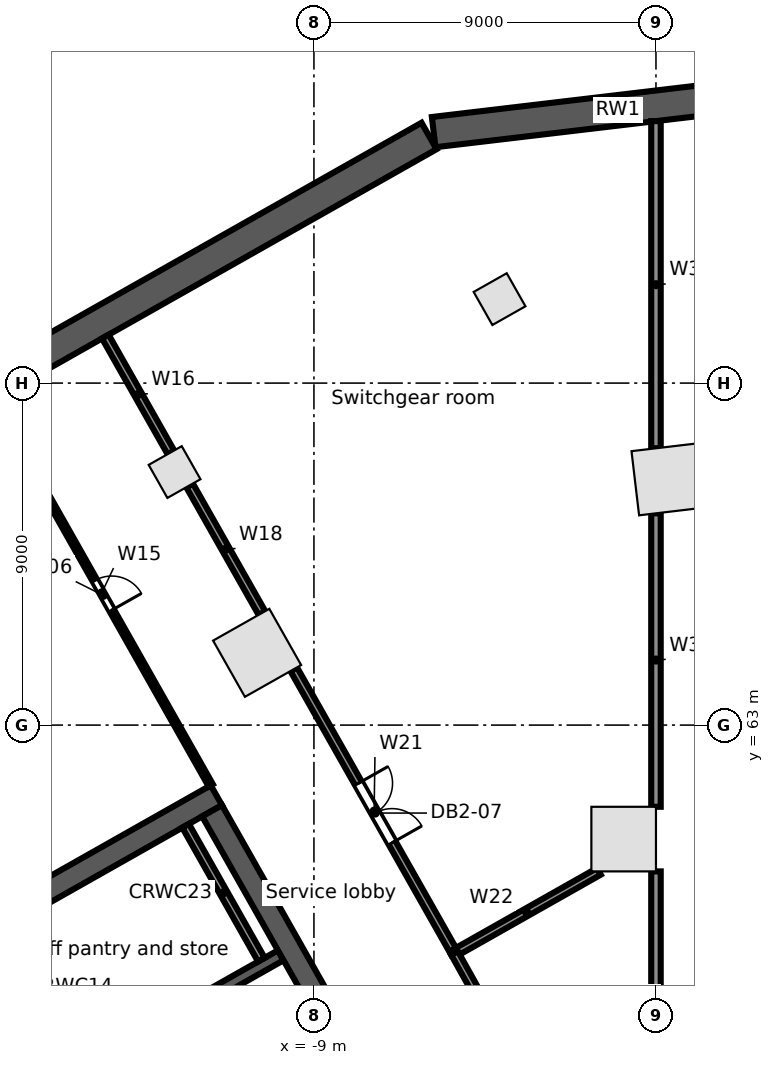
"""IFC4 building model, lengths in metres.
Left out: names, types, materials, properties, quantities, classifications, styles, units other than length and angle.
Written with IfcOpenShell. Run it as: python <this file> out.ifc"""

import sys

from ifc_helpers import new_model, si_unit, direction, frame, frame_2d, origin, origin_2d, place, context, subcontext, project, spatial, rectangle, extrude, element, fill, save


model = new_model("IFC4")
c1 = context("Model", 3, precision=1e-05, world=origin(), true_north=direction((0.0, 1.0)))
c2 = subcontext(c1, "Body", "Model", "MODEL_VIEW")
j1 = project(units=[si_unit("LENGTHUNIT", "METRE"), si_unit("PLANEANGLEUNIT", "RADIAN")], contexts=[c1])
p1 = place(None, origin())
s1 = spatial("IfcSite", under=j1, at=p1, CompositionType="ELEMENT")
p2 = place(p1, origin())
s2 = spatial("IfcBuilding", under=s1, at=p2, CompositionType="ELEMENT")
p3 = place(p2, frame((0.0, 0.0, -9.6)))
s3 = spatial("IfcBuildingStorey", under=s2, at=p3, CompositionType="ELEMENT", Elevation=-9.6)
p4 = place(p3, frame((3.848, 79.753, -0.5), z_axis=(0.0, 0.0, 1.0), x_axis=(-0.993067076287, -0.117549062072, 0.0)))
e1 = element("IfcWall", 1, at=p4, inside=s3, PredefinedType="SOLIDWALL", context=c2, shape_type="SweptSolid", body=[
    extrude(rectangle(XDim=9.766, YDim=0.8, at=frame_2d((4.883, 0.0))), origin(), (0.0, 0.0, 1.0), 5.3),
])
p5 = place(p3, frame((-5.971, 78.503, -0.5), z_axis=(0.0, 0.0, 1.0), x_axis=(-0.870356741611, -0.492421711882, 0.0)))
e2 = element("IfcWall", 2, at=p5, inside=s3, PredefinedType="SOLIDWALL", context=c2, shape_type="SweptSolid", body=[
    extrude(rectangle(XDim=70.604, YDim=0.8, at=frame_2d((35.302, 0.0))), origin(), (0.0, 0.0, 1.0), 5.3),
])
for number, where, z_axis, x_axis in (
    (3, (0.3, 69.464, -0.5), (0.0, 0.0, 1.0), (-0.993, -0.118, 0.0)),
    (4, (-10.495, 64.902, -0.5), (0.0, 0.0, 1.0), (-0.87, -0.492, 0.0)),
    (5, (-0.85, 60.0, -0.5), (0.0, 0.0, 1.0), (0.0, 1.0, 0.0)),
):
    element("IfcColumn", number, at=place(p3, frame(where, z_axis=z_axis, x_axis=x_axis)), inside=s3, PredefinedType="COLUMN", context=c2, shape_type="SweptSolid", body=[
        extrude(rectangle(XDim=1.7, YDim=1.7, at=origin_2d()), origin(), (0.0, 0.0, 1.0), 5.3),
    ])
for number, where, z_axis, x_axis in (
    (6, (-4.116, 74.21, -0.5), (0.0, 0.0, 1.0), (-0.87, -0.492, 0.0)),
    (7, (-12.667, 69.659, -0.5), (0.0, 0.0, 1.0), (-0.87, -0.492, 0.0)),
):
    element("IfcColumn", number, at=place(p3, frame(where, z_axis=z_axis, x_axis=x_axis)), inside=s3, PredefinedType="COLUMN", context=c2, shape_type="SweptSolid", body=[
        extrude(rectangle(XDim=1.0, YDim=1.0, at=origin_2d()), origin(), (0.0, 0.0, 1.0), 5.3),
    ])
p6 = place(p3, frame((-15.618, 53.691, 0.0), z_axis=(0.0, 0.0, 1.0), x_axis=(0.870356769198, 0.492421663121, 0.0)))
e8 = element("IfcWall", 8, at=p6, inside=s3, PredefinedType="SOLIDWALL", context=c2, shape_type="SweptSolid", body=[
    extrude(rectangle(XDim=6.6, YDim=0.3, at=frame_2d((3.3, 0.0))), origin(), (0.0, 0.0, 1.0), 4.4),
])
p7 = place(p6, frame((2.6, 0.0, 0.0)))
e9 = element("IfcOpeningElement", 9, at=p7, cuts=e8, PredefinedType="OPENING", context=c2, shape_type="SweptSolid", body=[
    extrude(rectangle(XDim=0.9, YDim=2.1, at=frame_2d((0.45, 1.05))), frame((0.0, 0.16, 0.0), z_axis=(0.0, -1.0, 0.0), x_axis=(1.0, 0.0, 0.0)), (0.0, 0.0, 1.0), 0.32),
])
p8 = place(p3, frame((-24.623, 53.767, 0.0), z_axis=(0.0, 0.0, 1.0), x_axis=(0.870356627484, 0.492421913601, 0.0)))
e10 = element("IfcWall", 10, at=p8, inside=s3, PredefinedType="SOLIDWALL", context=c2, shape_type="SweptSolid", body=[
    extrude(rectangle(XDim=15.0, YDim=0.6, at=frame_2d((7.5, 0.0))), origin(), (0.0, 0.0, 1.0), 4.4),
])
p9 = place(p3, frame((-17.686, 57.347, 0.0), z_axis=(0.0, 0.0, 1.0), x_axis=(0.492420746998, -0.870357287513, 0.0)))
e11 = element("IfcWall", 11, at=p9, inside=s3, PredefinedType="SOLIDWALL", context=c2, shape_type="SweptSolid", body=[
    extrude(rectangle(XDim=4.05, YDim=0.3, at=frame_2d((2.025, 0.0))), origin(), (0.0, 0.0, 1.0), 4.4),
])
p10 = place(p3, frame((-12.377, 60.351, 0.0), z_axis=(0.0, 0.0, 1.0), x_axis=(0.492440575896, -0.870346068648, 0.0)))
e12 = element("IfcWall", 12, at=p10, inside=s3, PredefinedType="SOLIDWALL", context=c2, shape_type="SweptSolid", body=[
    extrude(rectangle(XDim=4.05, YDim=0.2, at=frame_2d((2.025, 0.0))), origin(), (0.0, 0.0, 1.0), 4.4),
])
p11 = place(p3, frame((-11.681, 60.744, 0.0), z_axis=(0.0, 0.0, 1.0), x_axis=(0.492426772896, -0.870353878221, 0.0)))
e13 = element("IfcWall", 13, at=p11, inside=s3, PredefinedType="SOLIDWALL", context=c2, shape_type="SweptSolid", body=[
    extrude(rectangle(XDim=12.8, YDim=0.6, at=frame_2d((6.4, 0.0))), origin(), (0.0, 0.0, 1.0), 4.4),
])
p12 = place(p3, frame((-17.449, 71.549, 0.0), z_axis=(0.0, 0.0, 1.0), x_axis=(0.492408863594, -0.870364010661, 0.0)))
e14 = element("IfcWall", 14, at=p12, inside=s3, PredefinedType="PARTITIONING", context=c2, shape_type="SweptSolid", body=[
    extrude(rectangle(XDim=11.645, YDim=0.125, at=frame_2d((5.822, 0.0))), origin(), (0.0, 0.0, 1.0), 3.68),
])
p13 = place(p12, frame((5.45, 0.0, 0.0)))
e15 = element("IfcOpeningElement", 15, at=p13, cuts=e14, PredefinedType="OPENING", context=c2, shape_type="SweptSolid", body=[
    extrude(rectangle(XDim=0.9, YDim=2.1, at=frame_2d((0.45, 1.05))), frame((0.0, 0.073, 0.0), z_axis=(0.0, -1.0, 0.0), x_axis=(1.0, 0.0, 0.0)), (0.0, 0.0, 1.0), 0.145),
])
p14 = place(p3, frame((-14.49, 73.224, 0.0), z_axis=(0.0, 0.0, 1.0), x_axis=(0.492785561685, -0.870150785896, 0.0)))
e16 = element("IfcWall", 16, at=p14, inside=s3, PredefinedType="PARTITIONING", context=c2, shape_type="SweptSolid", body=[
    extrude(rectangle(XDim=3.501, YDim=0.2, at=frame_2d((1.75, 0.0))), origin(), (0.0, 0.0, 1.0), 4.4),
])
p15 = place(p3, frame((-12.272, 69.308, 0.0), z_axis=(0.0, 0.0, 1.0), x_axis=(0.492928006212, -0.870070101022, 0.0)))
e17 = element("IfcWall", 17, at=p15, inside=s3, PredefinedType="PARTITIONING", context=c2, shape_type="SweptSolid", body=[
    extrude(rectangle(XDim=3.861, YDim=0.2, at=frame_2d((1.93, 0.0))), origin(), (0.0, 0.0, 1.0), 3.462),
])
p16 = place(p3, frame((-9.532, 64.47, 0.0), z_axis=(0.0, 0.0, 1.0), x_axis=(0.492882680299, -0.870095778326, 0.0)))
e18 = element("IfcWall", 18, at=p16, inside=s3, PredefinedType="PARTITIONING", context=c2, shape_type="SweptSolid", body=[
    extrude(rectangle(XDim=8.584, YDim=0.2, at=frame_2d((4.292, 0.0))), origin(), (0.0, 0.0, 1.0), 3.462),
])
p17 = place(p16, frame((3.45, 0.0, 0.0)))
e19 = element("IfcOpeningElement", 19, at=p17, cuts=e18, PredefinedType="OPENING", context=c2, shape_type="SweptSolid", body=[
    extrude(rectangle(XDim=1.8, YDim=2.1, at=frame_2d((0.9, 1.05))), frame((0.0, 0.11, 0.0), z_axis=(0.0, -1.0, 0.0), x_axis=(1.0, 0.0, 0.0)), (0.0, 0.0, 1.0), 0.22),
])
p18 = place(p3, frame((-5.301, 57.001, 0.0), z_axis=(0.0, 0.0, 1.0), x_axis=(0.870403402545, 0.492339229433, 0.0)))
e20 = element("IfcWall", 20, at=p18, inside=s3, PredefinedType="PARTITIONING", context=c2, shape_type="SweptSolid", body=[
    extrude(rectangle(XDim=4.365, YDim=0.2, at=frame_2d((2.182, 0.0))), origin(), (0.0, 0.0, 1.0), 3.462),
])
p19 = place(p3, frame((-5.301, 57.001, 0.0), z_axis=(0.0, 0.0, 1.0), x_axis=(0.487215056149, -0.873282021492, 0.0)))
e21 = element("IfcWall", 21, at=p19, inside=s3, PredefinedType="PARTITIONING", context=c2, shape_type="SweptSolid", body=[
    extrude(rectangle(XDim=8.395, YDim=0.2, at=frame_2d((4.197, 0.0))), origin(), (0.0, 0.0, 1.0), 4.4),
])
p20 = place(p19, frame((3.2, 0.0, 0.0)))
e22 = element("IfcOpeningElement", 22, at=p20, cuts=e21, PredefinedType="OPENING", context=c2, shape_type="SweptSolid", body=[
    extrude(rectangle(XDim=1.8, YDim=2.1, at=frame_2d((0.9, 1.05))), frame((0.0, 0.11, 0.0), z_axis=(0.0, -1.0, 0.0), x_axis=(1.0, 0.0, 0.0)), (0.0, 0.0, 1.0), 0.22),
])
p21 = place(p3, frame((0.0, 49.726, 0.0), z_axis=(0.0, 0.0, 1.0), x_axis=(0.0, 1.0, 0.0)))
e23 = element("IfcWall", 23, at=p21, inside=s3, PredefinedType="PARTITIONING", context=c2, shape_type="SweptSolid", body=[
    extrude(rectangle(XDim=9.424, YDim=0.25, at=frame_2d((4.712, 0.0))), origin(), (0.0, 0.0, 1.0), 4.4),
])
p22 = place(p3, frame((0.0, 60.85, 0.0), z_axis=(0.0, 0.0, 1.0), x_axis=(0.0, 1.0, 0.0)))
e24 = element("IfcWall", 24, at=p22, inside=s3, PredefinedType="PARTITIONING", context=c2, shape_type="SweptSolid", body=[
    extrude(rectangle(XDim=7.723, YDim=0.25, at=frame_2d((3.861, 0.0))), origin(), (0.0, 0.0, 1.0), 3.68),
])
p23 = place(p3, frame((0.0, 70.285, 0.0), z_axis=(0.0, 0.0, 1.0), x_axis=(0.0, 1.0, 0.0)))
e25 = element("IfcWall", 25, at=p23, inside=s3, PredefinedType="PARTITIONING", context=c2, shape_type="SweptSolid", body=[
    extrude(rectangle(XDim=8.609, YDim=0.25, at=frame_2d((4.305, 0.0))), origin(), (0.0, 0.0, 1.0), 3.78),
])
p24 = place(p13, origin())
e26 = element("IfcDoor", 26, at=p24, inside=s3, OperationType="SINGLE_SWING_RIGHT", PredefinedType="DOOR", context=c2, shape_type="SweptSolid", body=[
    extrude(rectangle(XDim=0.9, YDim=2.1, at=frame_2d((0.45, 1.05))), frame((0.0, 0.025, 0.0), z_axis=(0.0, -1.0, 0.0), x_axis=(1.0, 0.0, 0.0)), (0.0, 0.0, 1.0), 0.05),
])
fill(e15, e26)
p25 = place(p17, origin())
e27 = element("IfcDoor", 27, at=p25, inside=s3, OperationType="DOUBLE_DOOR_SINGLE_SWING", PredefinedType="DOOR", context=c2, shape_type="SweptSolid", body=[
    extrude(rectangle(XDim=1.8, YDim=2.1, at=frame_2d((0.9, 1.05))), frame((0.0, 0.025, 0.0), z_axis=(0.0, -1.0, 0.0), x_axis=(1.0, 0.0, 0.0)), (0.0, 0.0, 1.0), 0.05),
])
fill(e19, e27)
save(model, sys.argv[1])
